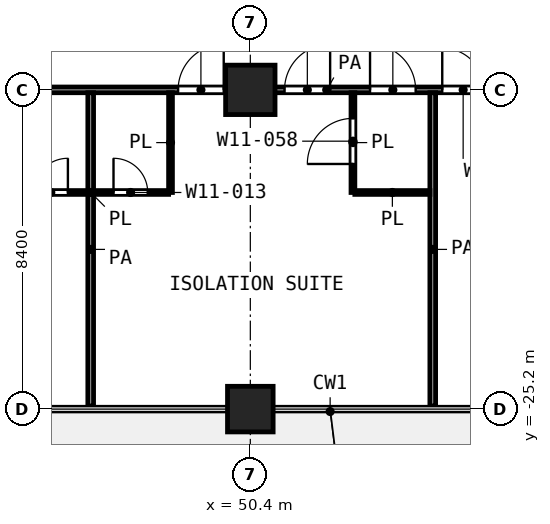
"""IFC4 building model, lengths in metres.
Left out: names, types, materials, properties, quantities, classifications, styles, units other than length and angle.
Written with IfcOpenShell. Run it as: python <this file> out.ifc"""

import sys

from ifc_helpers import new_model, si_unit, direction, frame, frame_2d, origin, origin_2d, place, context, subcontext, project, spatial, rectangle, extrude, element, fill, save


model = new_model("IFC4")
c1 = context("Model", 3, precision=1e-05, world=origin(), true_north=direction((0.0, 1.0)))
c2 = subcontext(c1, "Body", "Model", "MODEL_VIEW")
j1 = project(units=[si_unit("LENGTHUNIT", "METRE"), si_unit("PLANEANGLEUNIT", "RADIAN")], contexts=[c1])
p1 = place(None, origin())
s1 = spatial("IfcSite", under=j1, at=p1, CompositionType="ELEMENT")
p2 = place(p1, origin())
s2 = spatial("IfcBuilding", under=s1, at=p2, CompositionType="ELEMENT")
p3 = place(p2, frame((0.0, 0.0, 51.8)))
s3 = spatial("IfcBuildingStorey", under=s2, at=p3, CompositionType="ELEMENT", Elevation=51.8)
p4 = place(p3, frame((50.4, -16.8, 0.0), z_axis=(0.0, 0.0, 1.0), x_axis=(1.0, 0.0, 0.0)))
e1 = element("IfcColumn", 1, at=p4, inside=s3, PredefinedType="COLUMN", context=c2, shape_type="SweptSolid", body=[
    extrude(rectangle(XDim=1.3, YDim=1.3, at=origin_2d()), origin(), (0.0, 0.0, 1.0), 4.2),
])
p5 = place(p3, frame((50.4, -25.2, 0.0), z_axis=(0.0, 0.0, 1.0), x_axis=(1.0, 0.0, 0.0)))
e2 = element("IfcColumn", 2, at=p5, inside=s3, PredefinedType="COLUMN", context=c2, shape_type="SweptSolid", body=[
    extrude(rectangle(XDim=1.2, YDim=1.2, at=origin_2d()), origin(), (0.0, 0.0, 1.0), 4.2),
])
p6 = place(p3, frame((44.15, -19.5, 0.0), z_axis=(0.0, 0.0, 1.0), x_axis=(1.0, 0.0, 0.0)))
e3 = element("IfcWall", 3, at=p6, inside=s3, PredefinedType="PARTITIONING", context=c2, shape_type="SweptSolid", body=[
    extrude(rectangle(XDim=4.1, YDim=0.1, at=frame_2d((2.05, 0.0))), origin(), (0.0, 0.0, 1.0), 3.9),
])
p7 = place(p6, frame((0.55, 0.0, 0.0)))
e4 = element("IfcOpeningElement", 4, at=p7, cuts=e3, PredefinedType="OPENING", context=c2, shape_type="SweptSolid", body=[
    extrude(rectangle(XDim=0.9, YDim=2.1, at=frame_2d((0.45, 1.05))), frame((0.0, 0.06, 0.0), z_axis=(0.0, -1.0, 0.0), x_axis=(1.0, 0.0, 0.0)), (0.0, 0.0, 1.0), 0.12),
])
p8 = place(p6, frame((2.65, 0.0, 0.0)))
e5 = element("IfcOpeningElement", 5, at=p8, cuts=e3, PredefinedType="OPENING", context=c2, shape_type="SweptSolid", body=[
    extrude(rectangle(XDim=0.9, YDim=2.1, at=frame_2d((0.45, 1.05))), frame((0.0, 0.06, 0.0), z_axis=(0.0, -1.0, 0.0), x_axis=(1.0, 0.0, 0.0)), (0.0, 0.0, 1.0), 0.12),
])
p9 = place(p3, frame((53.15, -19.5, 0.0), z_axis=(0.0, 0.0, 1.0), x_axis=(1.0, 0.0, 0.0)))
e6 = element("IfcWall", 6, at=p9, inside=s3, PredefinedType="PARTITIONING", context=c2, shape_type="SweptSolid", body=[
    extrude(rectangle(XDim=1.975, YDim=0.1, at=frame_2d((0.988, 0.0))), origin(), (0.0, 0.0, 1.0), 3.9),
])
p10 = place(p3, frame((48.3, -19.5, 0.0), z_axis=(0.0, 0.0, 1.0), x_axis=(0.0, 1.0, 0.0)))
e7 = element("IfcWall", 7, at=p10, inside=s3, PredefinedType="PARTITIONING", context=c2, shape_type="SweptSolid", body=[
    extrude(rectangle(XDim=2.625, YDim=0.1, at=frame_2d((1.312, 0.0))), origin(), (0.0, 0.0, 1.0), 3.9),
])
p11 = place(p3, frame((53.1, -19.5, 0.0), z_axis=(0.0, 0.0, 1.0), x_axis=(0.0, 1.0, 0.0)))
e8 = element("IfcWall", 8, at=p11, inside=s3, PredefinedType="PARTITIONING", context=c2, shape_type="SweptSolid", body=[
    extrude(rectangle(XDim=2.625, YDim=0.1, at=frame_2d((1.312, 0.0))), origin(), (0.0, 0.0, 1.0), 3.9),
])
p12 = place(p11, frame((0.75, 0.0, 0.0)))
e9 = element("IfcOpeningElement", 9, at=p12, cuts=e8, PredefinedType="OPENING", context=c2, shape_type="SweptSolid", body=[
    extrude(rectangle(XDim=1.2, YDim=2.1, at=frame_2d((0.6, 1.05))), frame((0.0, 0.06, 0.0), z_axis=(0.0, -1.0, 0.0), x_axis=(1.0, 0.0, 0.0)), (0.0, 0.0, 1.0), 0.12),
])
p13 = place(p3, frame((25.1, -16.8, 0.0), z_axis=(0.0, 0.0, 1.0), x_axis=(1.0, 0.0, 0.0)))
e10 = element("IfcWall", 10, at=p13, inside=s3, PredefinedType="PARTITIONING", context=c2, shape_type="SweptSolid", body=[
    extrude(rectangle(XDim=54.62, YDim=0.15, at=frame_2d((27.31, 0.0))), origin(), (0.0, 0.0, 1.0), 3.9),
])
p14 = place(p13, frame((1.45, 0.0, 0.0)))
e11 = element("IfcOpeningElement", 11, at=p14, cuts=e10, PredefinedType="OPENING", context=c2, shape_type="SweptSolid", body=[
    extrude(rectangle(XDim=1.5, YDim=2.1, at=frame_2d((0.75, 1.05))), frame((0.0, 0.085, 0.0), z_axis=(0.0, -1.0, 0.0), x_axis=(1.0, 0.0, 0.0)), (0.0, 0.0, 1.0), 0.17),
])
p15 = place(p13, frame((9.25, 0.0, 0.0)))
e12 = element("IfcOpeningElement", 12, at=p15, cuts=e10, PredefinedType="OPENING", context=c2, shape_type="SweptSolid", body=[
    extrude(rectangle(XDim=1.5, YDim=2.1, at=frame_2d((0.75, 1.05))), frame((0.0, 0.085, 0.0), z_axis=(0.0, -1.0, 0.0), x_axis=(1.0, 0.0, 0.0)), (0.0, 0.0, 1.0), 0.17),
])
p16 = place(p13, frame((15.0, 0.0, 0.0)))
e13 = element("IfcOpeningElement", 13, at=p16, cuts=e10, PredefinedType="OPENING", context=c2, shape_type="SweptSolid", body=[
    extrude(rectangle(XDim=1.2, YDim=2.1, at=frame_2d((0.6, 1.05))), frame((0.0, 0.085, 0.0), z_axis=(0.0, -1.0, 0.0), x_axis=(1.0, 0.0, 0.0)), (0.0, 0.0, 1.0), 0.17),
])
p17 = place(p13, frame((17.6, 0.0, 0.0)))
e14 = element("IfcOpeningElement", 14, at=p17, cuts=e10, PredefinedType="OPENING", context=c2, shape_type="SweptSolid", body=[
    extrude(rectangle(XDim=1.2, YDim=2.1, at=frame_2d((0.6, 1.05))), frame((0.0, 0.085, 0.0), z_axis=(0.0, -1.0, 0.0), x_axis=(1.0, 0.0, 0.0)), (0.0, 0.0, 1.0), 0.17),
])
p18 = place(p13, frame((26.2, 0.0, 0.0)))
e15 = element("IfcOpeningElement", 15, at=p18, cuts=e10, PredefinedType="OPENING", context=c2, shape_type="SweptSolid", body=[
    extrude(rectangle(XDim=1.2, YDim=2.1, at=frame_2d((0.6, 1.05))), frame((0.0, 0.085, 0.0), z_axis=(0.0, -1.0, 0.0), x_axis=(1.0, 0.0, 0.0)), (0.0, 0.0, 1.0), 0.17),
])
p19 = place(p13, frame((23.4, 0.0, 0.0)))
e16 = element("IfcOpeningElement", 16, at=p19, cuts=e10, PredefinedType="OPENING", context=c2, shape_type="SweptSolid", body=[
    extrude(rectangle(XDim=1.2, YDim=2.1, at=frame_2d((0.6, 1.05))), frame((0.0, 0.085, 0.0), z_axis=(0.0, -1.0, 0.0), x_axis=(1.0, 0.0, 0.0)), (0.0, 0.0, 1.0), 0.17),
])
p20 = place(p13, frame((28.45, 0.0, 0.0)))
e17 = element("IfcOpeningElement", 17, at=p20, cuts=e10, PredefinedType="OPENING", context=c2, shape_type="SweptSolid", body=[
    extrude(rectangle(XDim=1.2, YDim=2.1, at=frame_2d((0.6, 1.05))), frame((0.0, 0.085, 0.0), z_axis=(0.0, -1.0, 0.0), x_axis=(1.0, 0.0, 0.0)), (0.0, 0.0, 1.0), 0.17),
])
p21 = place(p13, frame((31.8, 0.0, 0.0)))
e18 = element("IfcOpeningElement", 18, at=p21, cuts=e10, PredefinedType="OPENING", context=c2, shape_type="SweptSolid", body=[
    extrude(rectangle(XDim=1.2, YDim=2.1, at=frame_2d((0.6, 1.05))), frame((0.0, 0.085, 0.0), z_axis=(0.0, -1.0, 0.0), x_axis=(1.0, 0.0, 0.0)), (0.0, 0.0, 1.0), 0.17),
])
p22 = place(p13, frame((30.35, 0.0, 0.0)))
e19 = element("IfcOpeningElement", 19, at=p22, cuts=e10, PredefinedType="OPENING", context=c2, shape_type="SweptSolid", body=[
    extrude(rectangle(XDim=1.1, YDim=2.1, at=frame_2d((0.55, 1.05))), frame((0.0, 0.085, 0.0), z_axis=(0.0, -1.0, 0.0), x_axis=(1.0, 0.0, 0.0)), (0.0, 0.0, 1.0), 0.17),
])
p23 = place(p13, frame((40.2, 0.0, 0.0)))
e20 = element("IfcOpeningElement", 20, at=p23, cuts=e10, PredefinedType="OPENING", context=c2, shape_type="SweptSolid", body=[
    extrude(rectangle(XDim=1.2, YDim=2.1, at=frame_2d((0.6, 1.05))), frame((0.0, 0.085, 0.0), z_axis=(0.0, -1.0, 0.0), x_axis=(1.0, 0.0, 0.0)), (0.0, 0.0, 1.0), 0.17),
])
p24 = place(p13, frame((43.1, 0.0, 0.0)))
e21 = element("IfcOpeningElement", 21, at=p24, cuts=e10, PredefinedType="OPENING", context=c2, shape_type="SweptSolid", body=[
    extrude(rectangle(XDim=1.2, YDim=2.1, at=frame_2d((0.6, 1.05))), frame((0.0, 0.085, 0.0), z_axis=(0.0, -1.0, 0.0), x_axis=(1.0, 0.0, 0.0)), (0.0, 0.0, 1.0), 0.17),
])
p25 = place(p13, frame((51.2, 0.0, 0.0)))
e22 = element("IfcOpeningElement", 22, at=p25, cuts=e10, PredefinedType="OPENING", context=c2, shape_type="SweptSolid", body=[
    extrude(rectangle(XDim=1.5, YDim=2.1, at=frame_2d((0.75, 1.05))), frame((0.0, 0.085, 0.0), z_axis=(0.0, -1.0, 0.0), x_axis=(1.0, 0.0, 0.0)), (0.0, 0.0, 1.0), 0.17),
])
for number, where, z_axis, x_axis in (
    (23, (46.2, -25.12, 0.0), (0.0, 0.0, 1.0), (0.0, 1.0, 0.0)),
    (24, (55.2, -25.12, 0.0), (0.0, 0.0, 1.0), (0.0, 1.0, 0.0)),
):
    element("IfcWall", number, at=place(p3, frame(where, z_axis=z_axis, x_axis=x_axis)), inside=s3, PredefinedType="PARTITIONING", context=c2, shape_type="SweptSolid", body=[
        extrude(rectangle(XDim=8.245, YDim=0.15, at=frame_2d((4.123, 0.0))), origin(), (0.0, 0.0, 1.0), 3.9),
    ])
p26 = place(p7, origin())
e25 = element("IfcDoor", 25, at=p26, inside=s3, OperationType="SINGLE_SWING_RIGHT", PredefinedType="DOOR", context=c2, shape_type="SweptSolid", body=[
    extrude(rectangle(XDim=0.9, YDim=2.1, at=frame_2d((0.45, 1.05))), frame((0.0, 0.025, 0.0), z_axis=(0.0, -1.0, 0.0), x_axis=(1.0, 0.0, 0.0)), (0.0, 0.0, 1.0), 0.05),
])
fill(e4, e25)
p27 = place(p18, origin())
e26 = element("IfcDoor", 26, at=p27, inside=s3, OperationType="SINGLE_SWING_RIGHT", PredefinedType="DOOR", context=c2, shape_type="SweptSolid", body=[
    extrude(rectangle(XDim=1.2, YDim=2.1, at=frame_2d((0.6, 1.05))), frame((0.0, 0.025, 0.0), z_axis=(0.0, -1.0, 0.0), x_axis=(1.0, 0.0, 0.0)), (0.0, 0.0, 1.0), 0.05),
])
fill(e15, e26)
p28 = place(p19, origin())
e27 = element("IfcDoor", 27, at=p28, inside=s3, OperationType="SINGLE_SWING_RIGHT", PredefinedType="DOOR", context=c2, shape_type="SweptSolid", body=[
    extrude(rectangle(XDim=1.2, YDim=2.1, at=frame_2d((0.6, 1.05))), frame((0.0, 0.025, 0.0), z_axis=(0.0, -1.0, 0.0), x_axis=(1.0, 0.0, 0.0)), (0.0, 0.0, 1.0), 0.05),
])
fill(e16, e27)
p29 = place(p20, origin())
e28 = element("IfcDoor", 28, at=p29, inside=s3, OperationType="SINGLE_SWING_LEFT", PredefinedType="DOOR", context=c2, shape_type="SweptSolid", body=[
    extrude(rectangle(XDim=1.2, YDim=2.1, at=frame_2d((0.6, 1.05))), frame((0.0, 0.025, 0.0), z_axis=(0.0, -1.0, 0.0), x_axis=(1.0, 0.0, 0.0)), (0.0, 0.0, 1.0), 0.05),
])
fill(e17, e28)
p30 = place(p12, origin())
e29 = element("IfcDoor", 29, at=p30, inside=s3, OperationType="SINGLE_SWING_LEFT", PredefinedType="DOOR", context=c2, shape_type="SweptSolid", body=[
    extrude(rectangle(XDim=1.2, YDim=2.1, at=frame_2d((0.6, 1.05))), frame((0.0, 0.025, 0.0), z_axis=(0.0, -1.0, 0.0), x_axis=(1.0, 0.0, 0.0)), (0.0, 0.0, 1.0), 0.05),
])
fill(e9, e29)
p31 = place(p8, origin())
e30 = element("IfcDoor", 30, at=p31, inside=s3, OperationType="SINGLE_SWING_LEFT", PredefinedType="DOOR", context=c2, shape_type="SweptSolid", body=[
    extrude(rectangle(XDim=0.9, YDim=2.1, at=frame_2d((0.45, 1.05))), frame((0.0, 0.025, 0.0), z_axis=(0.0, -1.0, 0.0), x_axis=(1.0, 0.0, 0.0)), (0.0, 0.0, 1.0), 0.05),
])
fill(e5, e30)
p32 = place(p22, origin())
e31 = element("IfcDoor", 31, at=p32, inside=s3, OperationType="SINGLE_SWING_LEFT", PredefinedType="DOOR", context=c2, shape_type="SweptSolid", body=[
    extrude(rectangle(XDim=1.1, YDim=2.1, at=frame_2d((0.55, 1.05))), frame((0.0, 0.025, 0.0), z_axis=(0.0, -1.0, 0.0), x_axis=(1.0, 0.0, 0.0)), (0.0, 0.0, 1.0), 0.05),
])
fill(e19, e31)
save(model, sys.argv[1])
